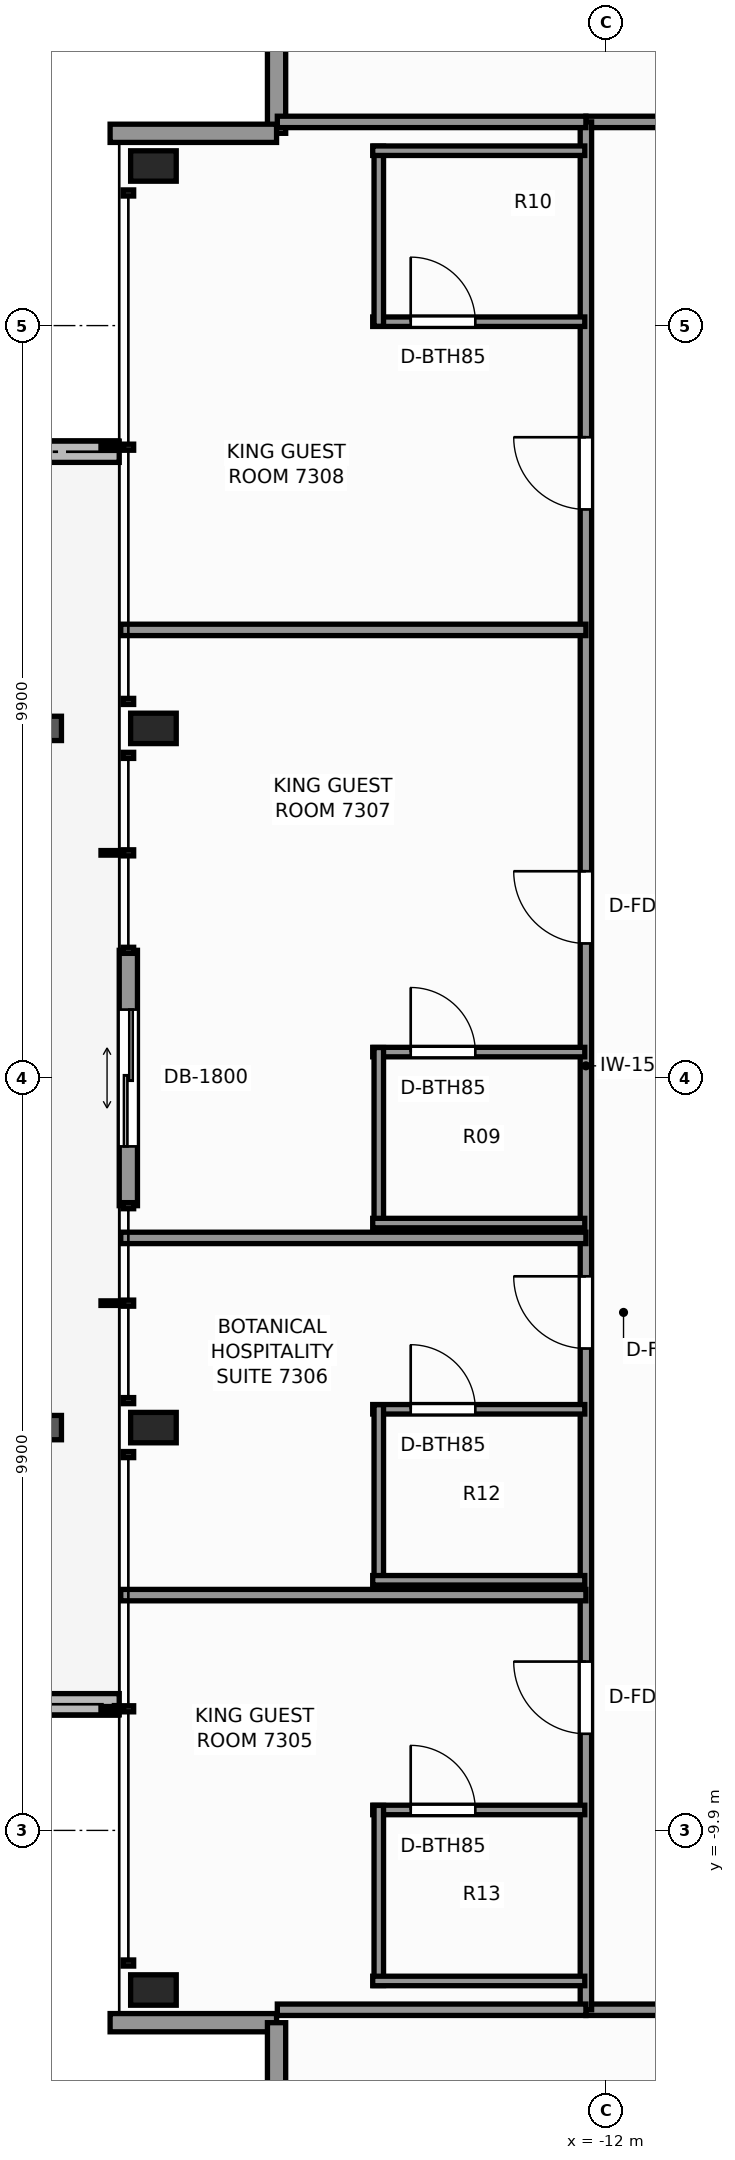
"""IFC4 building model, lengths in metres.
Left out: names, types, materials, properties, quantities, classifications, styles, units other than length and angle.
Written with IfcOpenShell. Run it as: python <this file> out.ifc"""

import sys

from ifc_helpers import new_model, si_unit, direction, frame, frame_2d, origin, origin_2d, place, context, subcontext, project, spatial, rectangle, extrude, element, fill, save


model = new_model("IFC4")
c1 = context("Model", 3, precision=1e-05, world=origin(), true_north=direction((0.0, 1.0)))
c2 = subcontext(c1, "Body", "Model", "MODEL_VIEW")
j1 = project(units=[si_unit("LENGTHUNIT", "METRE"), si_unit("PLANEANGLEUNIT", "RADIAN")], contexts=[c1])
p1 = place(None, origin())
s1 = spatial("IfcSite", under=j1, at=p1, CompositionType="ELEMENT")
p2 = place(p1, origin())
s2 = spatial("IfcBuilding", under=s1, at=p2, CompositionType="ELEMENT")
p3 = place(p2, frame((0.0, 0.0, 251.4)))
s3 = spatial("IfcBuildingStorey", under=s2, at=p3, CompositionType="ELEMENT", Elevation=251.4)
for number, where, z_axis, x_axis in (
    (1, (-17.95, -12.0, 0.0), (0.0, 0.0, 1.0), (1.0, 0.0, 0.0)),
    (2, (-17.95, -4.6, 0.0), (0.0, 0.0, 1.0), (1.0, 0.0, 0.0)),
    (3, (-17.95, 4.6, 0.0), (0.0, 0.0, 1.0), (1.0, 0.0, 0.0)),
    (4, (-17.95, 12.0, 0.0), (0.0, 0.0, 1.0), (1.0, 0.0, 0.0)),
):
    element("IfcColumn", number, at=place(p3, frame(where, z_axis=z_axis, x_axis=x_axis)), inside=s3, PredefinedType="COLUMN", context=c2, shape_type="SweptSolid", body=[
        extrude(rectangle(XDim=0.6, YDim=0.4, at=origin_2d()), origin(), (0.0, 0.0, 1.0), 3.5),
    ])
p4 = place(p3, frame((-21.614, -8.24, -0.07), z_axis=(0.0, 0.0, 1.0), x_axis=(1.0, 0.0, 0.0)))
e5 = element("IfcWall", 5, at=p4, inside=s3, PredefinedType="PARAPET", context=c2, shape_type="SweptSolid", body=[
    extrude(rectangle(XDim=3.214, YDim=0.28, at=frame_2d((1.607, 0.0))), origin(), (0.0, 0.0, 1.0), 0.42),
])
p5 = place(p3, frame((-18.4, 8.24, -0.07), z_axis=(0.0, 0.0, 1.0), x_axis=(-1.0, 0.0, 0.0)))
e6 = element("IfcWall", 6, at=p5, inside=s3, PredefinedType="PARAPET", context=c2, shape_type="SweptSolid", body=[
    extrude(rectangle(XDim=3.42, YDim=0.28, at=frame_2d((1.71, 0.0))), origin(), (0.0, 0.0, 1.0), 0.42),
])
p6 = place(p3, frame((-16.33, 12.43, 0.0), z_axis=(0.0, 0.0, 1.0), x_axis=(0.0, 1.0, 0.0)))
e7 = element("IfcWall", 7, at=p6, inside=s3, PredefinedType="STANDARD", context=c2, shape_type="SweptSolid", body=[
    extrude(rectangle(XDim=2.19, YDim=0.24, at=frame_2d((1.095, 0.0))), origin(), (0.0, 0.0, 1.0), 2.633),
])
p7 = place(p3, frame((-18.52, 12.43, 0.0), z_axis=(0.0, 0.0, 1.0), x_axis=(1.0, 0.0, 0.0)))
e8 = element("IfcWall", 8, at=p7, inside=s3, PredefinedType="STANDARD", context=c2, shape_type="SweptSolid", body=[
    extrude(rectangle(XDim=2.19, YDim=0.24, at=frame_2d((1.095, 0.0))), origin(), (0.0, 0.0, 1.0), 2.633),
])
p8 = place(p3, frame((-18.28, -1.68, 0.0), z_axis=(0.0, 0.0, 1.0), x_axis=(0.0, 1.0, 0.0)))
e9 = element("IfcWall", 9, at=p8, inside=s3, PredefinedType="STANDARD", context=c2, shape_type="SweptSolid", body=[
    extrude(rectangle(XDim=3.36, YDim=0.24, at=frame_2d((1.68, 0.0))), origin(), (0.0, 0.0, 1.0), 3.25),
])
p9 = place(p8, frame((0.78, 0.0, 0.0)))
e10 = element("IfcOpeningElement", 10, at=p9, cuts=e9, PredefinedType="OPENING", context=c2, shape_type="SweptSolid", body=[
    extrude(rectangle(XDim=1.8, YDim=2.2, at=frame_2d((0.9, 1.1))), frame((0.0, 0.13, 0.0), z_axis=(0.0, -1.0, 0.0), x_axis=(1.0, 0.0, 0.0)), (0.0, 0.0, 1.0), 0.26),
])
p10 = place(p3, frame((-16.33, -12.43, 0.0), z_axis=(0.0, 0.0, 1.0), x_axis=(-1.0, 0.0, 0.0)))
e11 = element("IfcWall", 11, at=p10, inside=s3, PredefinedType="STANDARD", context=c2, shape_type="SweptSolid", body=[
    extrude(rectangle(XDim=2.19, YDim=0.24, at=frame_2d((1.095, 0.0))), origin(), (0.0, 0.0, 1.0), 2.633),
])
p11 = place(p3, frame((-16.33, -14.62, 0.0), z_axis=(0.0, 0.0, 1.0), x_axis=(0.0, 1.0, 0.0)))
e12 = element("IfcWall", 12, at=p11, inside=s3, PredefinedType="STANDARD", context=c2, shape_type="SweptSolid", body=[
    extrude(rectangle(XDim=2.19, YDim=0.24, at=frame_2d((1.095, 0.0))), origin(), (0.0, 0.0, 1.0), 2.633),
])
p12 = place(p3, frame((-12.26, -12.26, 0.0), z_axis=(0.0, 0.0, 1.0), x_axis=(1.0, 0.0, 0.0)))
e13 = element("IfcWall", 13, at=p12, inside=s3, PredefinedType="PARTITIONING", context=c2, shape_type="SweptSolid", body=[
    extrude(rectangle(XDim=24.68, YDim=0.15, at=frame_2d((12.34, 0.0))), origin(), (0.0, 0.0, 1.0), 2.539),
])
p13 = place(p12, frame((4.216, 0.0, 0.0)))
e14 = element("IfcOpeningElement", 14, at=p13, cuts=e13, PredefinedType="OPENING", context=c2, shape_type="SweptSolid", body=[
    extrude(rectangle(XDim=0.9, YDim=2.06, at=frame_2d((0.45, 1.03))), frame((0.0, 0.085, 0.0), z_axis=(0.0, -1.0, 0.0), x_axis=(1.0, 0.0, 0.0)), (0.0, 0.0, 1.0), 0.17),
])
p14 = place(p12, frame((8.796, 0.0, 0.0)))
e15 = element("IfcOpeningElement", 15, at=p14, cuts=e13, PredefinedType="OPENING", context=c2, shape_type="SweptSolid", body=[
    extrude(rectangle(XDim=0.9, YDim=2.06, at=frame_2d((0.45, 1.03))), frame((0.0, 0.085, 0.0), z_axis=(0.0, -1.0, 0.0), x_axis=(1.0, 0.0, 0.0)), (0.0, 0.0, 1.0), 0.17),
])
p15 = place(p12, frame((12.922, 0.0, 0.0)))
e16 = element("IfcOpeningElement", 16, at=p15, cuts=e13, PredefinedType="OPENING", context=c2, shape_type="SweptSolid", body=[
    extrude(rectangle(XDim=0.95, YDim=2.06, at=frame_2d((0.475, 1.03))), frame((0.0, 0.085, 0.0), z_axis=(0.0, -1.0, 0.0), x_axis=(1.0, 0.0, 0.0)), (0.0, 0.0, 1.0), 0.17),
])
p16 = place(p12, frame((19.345, 0.0, 0.0)))
e17 = element("IfcOpeningElement", 17, at=p16, cuts=e13, PredefinedType="OPENING", context=c2, shape_type="SweptSolid", body=[
    extrude(rectangle(XDim=0.9, YDim=2.06, at=frame_2d((0.45, 1.03))), frame((0.0, 0.085, 0.0), z_axis=(0.0, -1.0, 0.0), x_axis=(1.0, 0.0, 0.0)), (0.0, 0.0, 1.0), 0.17),
])
p17 = place(p3, frame((-12.26, 12.58, 0.0), z_axis=(0.0, 0.0, 1.0), x_axis=(1.0, 0.0, 0.0)))
e18 = element("IfcWall", 18, at=p17, inside=s3, PredefinedType="PARTITIONING", context=c2, shape_type="SweptSolid", body=[
    extrude(rectangle(XDim=24.68, YDim=0.15, at=frame_2d((12.34, 0.0))), origin(), (0.0, 0.0, 1.0), 2.539),
])
p18 = place(p17, frame((3.188, 0.0, 0.0)))
e19 = element("IfcOpeningElement", 19, at=p18, cuts=e18, PredefinedType="OPENING", context=c2, shape_type="SweptSolid", body=[
    extrude(rectangle(XDim=0.95, YDim=2.06, at=frame_2d((0.475, 1.03))), frame((0.0, 0.085, 0.0), z_axis=(0.0, -1.0, 0.0), x_axis=(1.0, 0.0, 0.0)), (0.0, 0.0, 1.0), 0.17),
])
p19 = place(p17, frame((13.815, 0.0, 0.0)))
e20 = element("IfcOpeningElement", 20, at=p19, cuts=e18, PredefinedType="OPENING", context=c2, shape_type="SweptSolid", body=[
    extrude(rectangle(XDim=0.95, YDim=2.06, at=frame_2d((0.475, 1.03))), frame((0.0, 0.085, 0.0), z_axis=(0.0, -1.0, 0.0), x_axis=(1.0, 0.0, 0.0)), (0.0, 0.0, 1.0), 0.17),
])
p20 = place(p17, frame((19.178, 0.0, 0.0)))
e21 = element("IfcOpeningElement", 21, at=p20, cuts=e18, PredefinedType="OPENING", context=c2, shape_type="SweptSolid", body=[
    extrude(rectangle(XDim=0.95, YDim=2.06, at=frame_2d((0.475, 1.03))), frame((0.0, 0.085, 0.0), z_axis=(0.0, -1.0, 0.0), x_axis=(1.0, 0.0, 0.0)), (0.0, 0.0, 1.0), 0.17),
])
p21 = place(p3, frame((-12.26, -12.26, 0.0), z_axis=(0.0, 0.0, 1.0), x_axis=(0.0, 1.0, 0.0)))
e22 = element("IfcWall", 22, at=p21, inside=s3, PredefinedType="PARTITIONING", context=c2, shape_type="SweptSolid", body=[
    extrude(rectangle(XDim=24.84, YDim=0.15, at=frame_2d((12.42, 0.0))), origin(), (0.0, 0.0, 1.0), 2.539),
])
p22 = place(p21, frame((3.631, 0.0, 0.0)))
e23 = element("IfcOpeningElement", 23, at=p22, cuts=e22, PredefinedType="OPENING", context=c2, shape_type="SweptSolid", body=[
    extrude(rectangle(XDim=0.95, YDim=2.06, at=frame_2d((0.475, 1.03))), frame((0.0, 0.085, 0.0), z_axis=(0.0, -1.0, 0.0), x_axis=(1.0, 0.0, 0.0)), (0.0, 0.0, 1.0), 0.17),
])
p23 = place(p21, frame((8.701, 0.0, 0.0)))
e24 = element("IfcOpeningElement", 24, at=p23, cuts=e22, PredefinedType="OPENING", context=c2, shape_type="SweptSolid", body=[
    extrude(rectangle(XDim=0.95, YDim=2.06, at=frame_2d((0.475, 1.03))), frame((0.0, 0.085, 0.0), z_axis=(0.0, -1.0, 0.0), x_axis=(1.0, 0.0, 0.0)), (0.0, 0.0, 1.0), 0.17),
])
p24 = place(p21, frame((14.031, 0.0, 0.0)))
e25 = element("IfcOpeningElement", 25, at=p24, cuts=e22, PredefinedType="OPENING", context=c2, shape_type="SweptSolid", body=[
    extrude(rectangle(XDim=0.95, YDim=2.06, at=frame_2d((0.475, 1.03))), frame((0.0, 0.085, 0.0), z_axis=(0.0, -1.0, 0.0), x_axis=(1.0, 0.0, 0.0)), (0.0, 0.0, 1.0), 0.17),
])
p25 = place(p21, frame((19.741, 0.0, 0.0)))
e26 = element("IfcOpeningElement", 26, at=p25, cuts=e22, PredefinedType="OPENING", context=c2, shape_type="SweptSolid", body=[
    extrude(rectangle(XDim=0.95, YDim=2.06, at=frame_2d((0.475, 1.03))), frame((0.0, 0.085, 0.0), z_axis=(0.0, -1.0, 0.0), x_axis=(1.0, 0.0, 0.0)), (0.0, 0.0, 1.0), 0.17),
])
for number, where, z_axis, x_axis in (
    (27, (-16.32, -12.26, 0.0), (0.0, 0.0, 1.0), (1.0, 0.0, 0.0)),
    (28, (-16.32, 12.58, 0.0), (0.0, 0.0, 1.0), (1.0, 0.0, 0.0)),
):
    element("IfcWall", number, at=place(p3, frame(where, z_axis=z_axis, x_axis=x_axis)), inside=s3, PredefinedType="PARTITIONING", context=c2, shape_type="SweptSolid", body=[
        extrude(rectangle(XDim=4.06, YDim=0.15, at=frame_2d((2.03, 0.0))), origin(), (0.0, 0.0, 1.0), 3.25),
    ])
p26 = place(p3, frame((-18.38, -6.804, 0.0), z_axis=(0.0, 0.0, 1.0), x_axis=(1.0, 0.0, 0.0)))
e29 = element("IfcWall", 29, at=p26, inside=s3, PredefinedType="PARTITIONING", context=c2, shape_type="SweptSolid", body=[
    extrude(rectangle(XDim=6.12, YDim=0.15, at=frame_2d((3.06, 0.0))), origin(), (0.0, 0.0, 1.0), 2.623),
])
p27 = place(p3, frame((-15.065, -9.631, 0.0), z_axis=(0.0, 0.0, 1.0), x_axis=(1.0, 0.0, 0.0)))
e30 = element("IfcWall", 30, at=p27, inside=s3, PredefinedType="PARTITIONING", context=c2, shape_type="SweptSolid", body=[
    extrude(rectangle(XDim=2.79, YDim=0.125, at=frame_2d((1.395, 0.0))), origin(), (0.0, 0.0, 1.0), 3.25),
])
p28 = place(p27, frame((0.5, 0.0, 0.0)))
e31 = element("IfcOpeningElement", 31, at=p28, cuts=e30, PredefinedType="OPENING", context=c2, shape_type="SweptSolid", body=[
    extrude(rectangle(XDim=0.85, YDim=2.03, at=frame_2d((0.425, 1.015))), frame((0.0, 0.073, 0.0), z_axis=(0.0, -1.0, 0.0), x_axis=(1.0, 0.0, 0.0)), (0.0, 0.0, 1.0), 0.145),
])
p29 = place(p3, frame((-14.985, -11.941, 0.0), z_axis=(0.0, 0.0, 1.0), x_axis=(0.0, 1.0, 0.0)))
e32 = element("IfcWall", 32, at=p29, inside=s3, PredefinedType="PARTITIONING", context=c2, shape_type="SweptSolid", body=[
    extrude(rectangle(XDim=2.37, YDim=0.125, at=frame_2d((1.185, 0.0))), origin(), (0.0, 0.0, 1.0), 2.539),
])
p30 = place(p3, frame((-15.065, -11.881, 0.0), z_axis=(0.0, 0.0, 1.0), x_axis=(1.0, 0.0, 0.0)))
e33 = element("IfcWall", 33, at=p30, inside=s3, PredefinedType="PARTITIONING", context=c2, shape_type="SweptSolid", body=[
    extrude(rectangle(XDim=2.79, YDim=0.125, at=frame_2d((1.395, 0.0))), origin(), (0.0, 0.0, 1.0), 3.25),
])
p31 = place(p3, frame((-18.38, -2.104, 0.0), z_axis=(0.0, 0.0, 1.0), x_axis=(1.0, 0.0, 0.0)))
e34 = element("IfcWall", 34, at=p31, inside=s3, PredefinedType="PARTITIONING", context=c2, shape_type="SweptSolid", body=[
    extrude(rectangle(XDim=6.12, YDim=0.15, at=frame_2d((3.06, 0.0))), origin(), (0.0, 0.0, 1.0), 2.623),
])
p32 = place(p3, frame((-15.065, -4.359, 0.0), z_axis=(0.0, 0.0, 1.0), x_axis=(1.0, 0.0, 0.0)))
e35 = element("IfcWall", 35, at=p32, inside=s3, PredefinedType="PARTITIONING", context=c2, shape_type="SweptSolid", body=[
    extrude(rectangle(XDim=2.79, YDim=0.125, at=frame_2d((1.395, 0.0))), origin(), (0.0, 0.0, 1.0), 2.539),
])
p33 = place(p32, frame((0.5, 0.0, 0.0)))
e36 = element("IfcOpeningElement", 36, at=p33, cuts=e35, PredefinedType="OPENING", context=c2, shape_type="SweptSolid", body=[
    extrude(rectangle(XDim=0.85, YDim=2.03, at=frame_2d((0.425, 1.015))), frame((0.0, 0.073, 0.0), z_axis=(0.0, -1.0, 0.0), x_axis=(1.0, 0.0, 0.0)), (0.0, 0.0, 1.0), 0.145),
])
p34 = place(p3, frame((-14.985, -6.669, 0.0), z_axis=(0.0, 0.0, 1.0), x_axis=(0.0, 1.0, 0.0)))
e37 = element("IfcWall", 37, at=p34, inside=s3, PredefinedType="PARTITIONING", context=c2, shape_type="SweptSolid", body=[
    extrude(rectangle(XDim=2.37, YDim=0.125, at=frame_2d((1.185, 0.0))), origin(), (0.0, 0.0, 1.0), 2.539),
])
p35 = place(p3, frame((-15.065, -6.609, 0.0), z_axis=(0.0, 0.0, 1.0), x_axis=(1.0, 0.0, 0.0)))
e38 = element("IfcWall", 38, at=p35, inside=s3, PredefinedType="PARTITIONING", context=c2, shape_type="SweptSolid", body=[
    extrude(rectangle(XDim=2.79, YDim=0.125, at=frame_2d((1.395, 0.0))), origin(), (0.0, 0.0, 1.0), 3.25),
])
p36 = place(p3, frame((-18.38, 5.896, 0.0), z_axis=(0.0, 0.0, 1.0), x_axis=(1.0, 0.0, 0.0)))
e39 = element("IfcWall", 39, at=p36, inside=s3, PredefinedType="PARTITIONING", context=c2, shape_type="SweptSolid", body=[
    extrude(rectangle(XDim=6.12, YDim=0.15, at=frame_2d((3.06, 0.0))), origin(), (0.0, 0.0, 1.0), 2.623),
])
p37 = place(p3, frame((-15.065, 0.341, 0.0), z_axis=(0.0, 0.0, 1.0), x_axis=(1.0, 0.0, 0.0)))
e40 = element("IfcWall", 40, at=p37, inside=s3, PredefinedType="PARTITIONING", context=c2, shape_type="SweptSolid", body=[
    extrude(rectangle(XDim=2.79, YDim=0.125, at=frame_2d((1.395, 0.0))), origin(), (0.0, 0.0, 1.0), 3.25),
])
p38 = place(p37, frame((0.5, 0.0, 0.0)))
e41 = element("IfcOpeningElement", 41, at=p38, cuts=e40, PredefinedType="OPENING", context=c2, shape_type="SweptSolid", body=[
    extrude(rectangle(XDim=0.85, YDim=2.03, at=frame_2d((0.425, 1.015))), frame((0.0, 0.073, 0.0), z_axis=(0.0, -1.0, 0.0), x_axis=(1.0, 0.0, 0.0)), (0.0, 0.0, 1.0), 0.145),
])
p39 = place(p3, frame((-14.985, -1.969, 0.0), z_axis=(0.0, 0.0, 1.0), x_axis=(0.0, 1.0, 0.0)))
e42 = element("IfcWall", 42, at=p39, inside=s3, PredefinedType="PARTITIONING", context=c2, shape_type="SweptSolid", body=[
    extrude(rectangle(XDim=2.37, YDim=0.125, at=frame_2d((1.185, 0.0))), origin(), (0.0, 0.0, 1.0), 2.775),
])
p40 = place(p3, frame((-15.065, -1.909, 0.0), z_axis=(0.0, 0.0, 1.0), x_axis=(1.0, 0.0, 0.0)))
e43 = element("IfcWall", 43, at=p40, inside=s3, PredefinedType="PARTITIONING", context=c2, shape_type="SweptSolid", body=[
    extrude(rectangle(XDim=2.79, YDim=0.125, at=frame_2d((1.395, 0.0))), origin(), (0.0, 0.0, 1.0), 3.25),
])
p41 = place(p3, frame((-15.065, 9.951, 0.0), z_axis=(0.0, 0.0, 1.0), x_axis=(1.0, 0.0, 0.0)))
e44 = element("IfcWall", 44, at=p41, inside=s3, PredefinedType="PARTITIONING", context=c2, shape_type="SweptSolid", body=[
    extrude(rectangle(XDim=2.79, YDim=0.125, at=frame_2d((1.395, 0.0))), origin(), (0.0, 0.0, 1.0), 3.25),
])
p42 = place(p41, frame((0.5, 0.0, 0.0)))
e45 = element("IfcOpeningElement", 45, at=p42, cuts=e44, PredefinedType="OPENING", context=c2, shape_type="SweptSolid", body=[
    extrude(rectangle(XDim=0.85, YDim=2.03, at=frame_2d((0.425, 1.015))), frame((0.0, 0.073, 0.0), z_axis=(0.0, -1.0, 0.0), x_axis=(1.0, 0.0, 0.0)), (0.0, 0.0, 1.0), 0.145),
])
p43 = place(p3, frame((-14.985, 9.891, 0.0), z_axis=(0.0, 0.0, 1.0), x_axis=(0.0, 1.0, 0.0)))
e46 = element("IfcWall", 46, at=p43, inside=s3, PredefinedType="PARTITIONING", context=c2, shape_type="SweptSolid", body=[
    extrude(rectangle(XDim=2.37, YDim=0.125, at=frame_2d((1.185, 0.0))), origin(), (0.0, 0.0, 1.0), 2.539),
])
p44 = place(p3, frame((-15.065, 12.201, 0.0), z_axis=(0.0, 0.0, 1.0), x_axis=(1.0, 0.0, 0.0)))
e47 = element("IfcWall", 47, at=p44, inside=s3, PredefinedType="PARTITIONING", context=c2, shape_type="SweptSolid", body=[
    extrude(rectangle(XDim=2.79, YDim=0.125, at=frame_2d((1.395, 0.0))), origin(), (0.0, 0.0, 1.0), 3.25),
])
p45 = place(p9, origin())
e48 = element("IfcDoor", 48, at=p45, inside=s3, OperationType="DOUBLE_DOOR_SLIDING", PredefinedType="DOOR", context=c2, shape_type="SweptSolid", body=[
    extrude(rectangle(XDim=1.8, YDim=2.2, at=frame_2d((0.9, 1.1))), frame((0.0, 0.025, 0.0), z_axis=(0.0, -1.0, 0.0), x_axis=(1.0, 0.0, 0.0)), (0.0, 0.0, 1.0), 0.05),
])
fill(e10, e48)
p46 = place(p28, origin())
e49 = element("IfcDoor", 49, at=p46, inside=s3, OperationType="SINGLE_SWING_LEFT", PredefinedType="DOOR", context=c2, shape_type="SweptSolid", body=[
    extrude(rectangle(XDim=0.85, YDim=2.03, at=frame_2d((0.425, 1.015))), frame((0.0, 0.025, 0.0), z_axis=(0.0, -1.0, 0.0), x_axis=(1.0, 0.0, 0.0)), (0.0, 0.0, 1.0), 0.05),
])
fill(e31, e49)
p47 = place(p22, origin())
e50 = element("IfcDoor", 50, at=p47, inside=s3, OperationType="SINGLE_SWING_RIGHT", PredefinedType="DOOR", context=c2, shape_type="SweptSolid", body=[
    extrude(rectangle(XDim=0.95, YDim=2.06, at=frame_2d((0.475, 1.03))), frame((0.0, 0.025, 0.0), z_axis=(0.0, -1.0, 0.0), x_axis=(1.0, 0.0, 0.0)), (0.0, 0.0, 1.0), 0.05),
])
fill(e23, e50)
p48 = place(p33, origin())
e51 = element("IfcDoor", 51, at=p48, inside=s3, OperationType="SINGLE_SWING_LEFT", PredefinedType="DOOR", context=c2, shape_type="SweptSolid", body=[
    extrude(rectangle(XDim=0.85, YDim=2.03, at=frame_2d((0.425, 1.015))), frame((0.0, 0.025, 0.0), z_axis=(0.0, -1.0, 0.0), x_axis=(1.0, 0.0, 0.0)), (0.0, 0.0, 1.0), 0.05),
])
fill(e36, e51)
p49 = place(p23, origin())
e52 = element("IfcDoor", 52, at=p49, inside=s3, OperationType="SINGLE_SWING_RIGHT", PredefinedType="DOOR", context=c2, shape_type="SweptSolid", body=[
    extrude(rectangle(XDim=0.95, YDim=2.06, at=frame_2d((0.475, 1.03))), frame((0.0, 0.025, 0.0), z_axis=(0.0, -1.0, 0.0), x_axis=(1.0, 0.0, 0.0)), (0.0, 0.0, 1.0), 0.05),
])
fill(e24, e52)
p50 = place(p38, origin())
e53 = element("IfcDoor", 53, at=p50, inside=s3, OperationType="SINGLE_SWING_LEFT", PredefinedType="DOOR", context=c2, shape_type="SweptSolid", body=[
    extrude(rectangle(XDim=0.85, YDim=2.03, at=frame_2d((0.425, 1.015))), frame((0.0, 0.025, 0.0), z_axis=(0.0, -1.0, 0.0), x_axis=(1.0, 0.0, 0.0)), (0.0, 0.0, 1.0), 0.05),
])
fill(e41, e53)
p51 = place(p24, origin())
e54 = element("IfcDoor", 54, at=p51, inside=s3, OperationType="SINGLE_SWING_RIGHT", PredefinedType="DOOR", context=c2, shape_type="SweptSolid", body=[
    extrude(rectangle(XDim=0.95, YDim=2.06, at=frame_2d((0.475, 1.03))), frame((0.0, 0.025, 0.0), z_axis=(0.0, -1.0, 0.0), x_axis=(1.0, 0.0, 0.0)), (0.0, 0.0, 1.0), 0.05),
])
fill(e25, e54)
p52 = place(p42, origin())
e55 = element("IfcDoor", 55, at=p52, inside=s3, OperationType="SINGLE_SWING_LEFT", PredefinedType="DOOR", context=c2, shape_type="SweptSolid", body=[
    extrude(rectangle(XDim=0.85, YDim=2.03, at=frame_2d((0.425, 1.015))), frame((0.0, 0.025, 0.0), z_axis=(0.0, -1.0, 0.0), x_axis=(1.0, 0.0, 0.0)), (0.0, 0.0, 1.0), 0.05),
])
fill(e45, e55)
p53 = place(p25, origin())
e56 = element("IfcDoor", 56, at=p53, inside=s3, OperationType="SINGLE_SWING_RIGHT", PredefinedType="DOOR", context=c2, shape_type="SweptSolid", body=[
    extrude(rectangle(XDim=0.95, YDim=2.06, at=frame_2d((0.475, 1.03))), frame((0.0, 0.025, 0.0), z_axis=(0.0, -1.0, 0.0), x_axis=(1.0, 0.0, 0.0)), (0.0, 0.0, 1.0), 0.05),
])
fill(e26, e56)
save(model, sys.argv[1])
